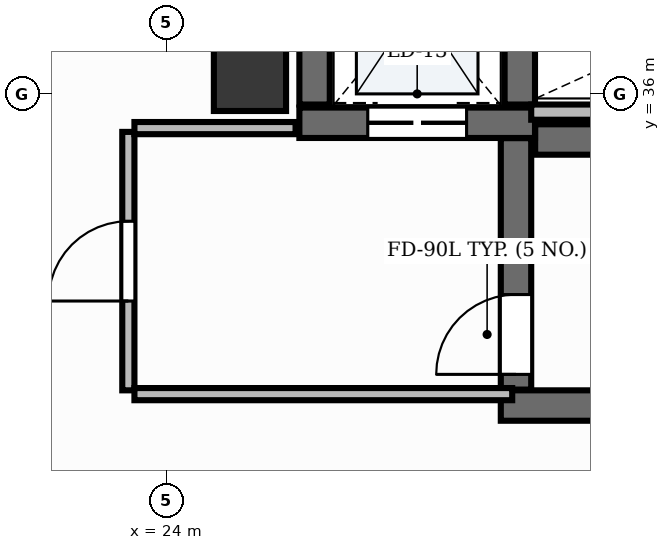
"""IFC4 building model, lengths in metres.
Left out: names, types, materials, properties, quantities, classifications, styles, units other than length and angle.
Written with IfcOpenShell. Run it as: python <this file> out.ifc"""

import sys

from ifc_helpers import new_model, si_unit, direction, frame, frame_2d, origin, origin_2d, place, context, subcontext, project, spatial, rectangle, extrude, element, fill, save


model = new_model("IFC4")
c1 = context("Model", 3, precision=1e-05, world=origin(), true_north=direction((0.0, 1.0)))
c2 = subcontext(c1, "Body", "Model", "MODEL_VIEW")
j1 = project(units=[si_unit("LENGTHUNIT", "METRE"), si_unit("PLANEANGLEUNIT", "RADIAN")], contexts=[c1])
p1 = place(None, origin())
s1 = spatial("IfcSite", under=j1, at=p1, CompositionType="ELEMENT")
p2 = place(p1, origin())
s2 = spatial("IfcBuilding", under=s1, at=p2, CompositionType="ELEMENT")
p3 = place(p2, frame((0.0, 0.0, 175.2)))
s3 = spatial("IfcBuildingStorey", under=s2, at=p3, CompositionType="ELEMENT", Elevation=175.2)
p4 = place(p3, frame((28.852, 35.4, 0.0), z_axis=(0.0, 0.0, 1.0), x_axis=(1.0, 0.0, 0.0)))
e1 = element("IfcWall", 1, at=p4, inside=s3, PredefinedType="SHEAR", context=c2, shape_type="SweptSolid", body=[
    extrude(rectangle(XDim=8.198, YDim=0.4, at=frame_2d((4.099, 0.0))), origin(), (0.0, 0.0, 1.0), 3.9),
])
p5 = place(p3, frame((28.4, 31.9, 0.0), z_axis=(0.0, 0.0, 1.0), x_axis=(1.0, 0.0, 0.0)))
e2 = element("IfcWall", 2, at=p5, inside=s3, PredefinedType="SHEAR", context=c2, shape_type="SweptSolid", body=[
    extrude(rectangle(XDim=8.65, YDim=0.4, at=frame_2d((4.325, 0.0))), origin(), (0.0, 0.0, 1.0), 3.9),
])
p6 = place(p3, frame((28.6, 32.11, 0.0), z_axis=(0.0, 0.0, 1.0), x_axis=(0.0, 1.0, 0.0)))
e3 = element("IfcWall", 3, at=p6, inside=s3, PredefinedType="SHEAR", context=c2, shape_type="SweptSolid", body=[
    extrude(rectangle(XDim=3.308, YDim=0.4, at=frame_2d((1.654, 0.0))), origin(), (0.0, 0.0, 1.0), 3.9),
])
p7 = place(p6, frame((0.2, 0.0, 0.0)))
e4 = element("IfcOpeningElement", 4, at=p7, cuts=e3, PredefinedType="OPENING", context=c2, shape_type="SweptSolid", body=[
    extrude(rectangle(XDim=1.05, YDim=2.15, at=frame_2d((0.525, 1.075))), frame((0.0, 0.215, 0.0), z_axis=(0.0, -1.0, 0.0), x_axis=(1.0, 0.0, 0.0)), (0.0, 0.0, 1.0), 0.43),
])
p8 = place(p3, frame((25.75, 35.62, 0.0), z_axis=(0.0, 0.0, 1.0), x_axis=(1.0, 0.0, 0.0)))
e5 = element("IfcWall", 5, at=p8, inside=s3, PredefinedType="SHEAR", context=c2, shape_type="SweptSolid", body=[
    extrude(rectangle(XDim=3.1, YDim=0.4, at=frame_2d((1.55, 0.0))), origin(), (0.0, 0.0, 1.0), 3.9),
])
p9 = place(p8, frame((0.9, 0.0, 0.0)))
e6 = element("IfcOpeningElement", 6, at=p9, cuts=e5, PredefinedType="OPENING", context=c2, shape_type="SweptSolid", body=[
    extrude(rectangle(XDim=1.3, YDim=2.2, at=frame_2d((0.65, 1.1))), frame((0.0, 0.215, 0.0), z_axis=(0.0, -1.0, 0.0), x_axis=(1.0, 0.0, 0.0)), (0.0, 0.0, 1.0), 0.43),
])
for number, where, z_axis, x_axis in (
    (7, (25.95, 35.86, 0.0), (0.0, 0.0, 1.0), (0.0, 1.0, 0.0)),
    (8, (28.65, 35.86, 0.0), (0.0, 0.0, 1.0), (0.0, 1.0, 0.0)),
):
    element("IfcWall", number, at=place(p3, frame(where, z_axis=z_axis, x_axis=x_axis)), inside=s3, PredefinedType="SHEAR", context=c2, shape_type="SweptSolid", body=[
        extrude(rectangle(XDim=2.7, YDim=0.4, at=frame_2d((1.35, 0.0))), origin(), (0.0, 0.0, 1.0), 3.9),
    ])
p10 = place(p3, frame((25.1, 36.25, -0.0), z_axis=(0.0, 0.0, 1.0), x_axis=(1.0, 0.0, 0.0)))
e9 = element("IfcColumn", 9, at=p10, inside=s3, PredefinedType="PILASTER", context=c2, shape_type="SweptSolid", body=[
    extrude(rectangle(XDim=0.95, YDim=0.95, at=origin_2d()), origin(), (0.0, 0.0, 1.0), 3.901),
])
p11 = place(p3, frame((28.8, 35.76, 0.0), z_axis=(0.0, 0.0, 1.0), x_axis=(1.0, 0.0, 0.0)))
e10 = element("IfcWall", 10, at=p11, inside=s3, PredefinedType="PARTITIONING", context=c2, shape_type="SweptSolid", body=[
    extrude(rectangle(XDim=4.57, YDim=0.2, at=frame_2d((2.285, 0.0))), origin(), (0.0, 0.0, 1.0), 2.91),
])
p12 = place(p3, frame((23.5, 32.1, 0.0), z_axis=(0.0, 0.0, 1.0), x_axis=(0.0, 1.0, 0.0)))
e11 = element("IfcWall", 11, at=p12, inside=s3, PredefinedType="PARTITIONING", context=c2, shape_type="SweptSolid", body=[
    extrude(rectangle(XDim=3.4, YDim=0.16, at=frame_2d((1.7, 0.0))), origin(), (0.0, 0.0, 1.0), 2.91),
])
p13 = place(p12, frame((1.175, 0.0, 0.0)))
e12 = element("IfcOpeningElement", 12, at=p13, cuts=e11, PredefinedType="OPENING", context=c2, shape_type="SweptSolid", body=[
    extrude(rectangle(XDim=1.05, YDim=2.15, at=frame_2d((0.525, 1.075))), frame((0.0, 0.095, 0.0), z_axis=(0.0, -1.0, 0.0), x_axis=(1.0, 0.0, 0.0)), (0.0, 0.0, 1.0), 0.19),
])
p14 = place(p3, frame((23.58, 32.05, 0.0), z_axis=(0.0, 0.0, 1.0), x_axis=(1.0, 0.0, 0.0)))
e13 = element("IfcWall", 13, at=p14, inside=s3, PredefinedType="PARTITIONING", context=c2, shape_type="SweptSolid", body=[
    extrude(rectangle(XDim=4.97, YDim=0.16, at=frame_2d((2.485, 0.0))), origin(), (0.0, 0.0, 1.0), 2.91),
])
p15 = place(p3, frame((23.58, 35.55, 0.0), z_axis=(0.0, 0.0, 1.0), x_axis=(1.0, 0.0, 0.0)))
e14 = element("IfcWall", 14, at=p15, inside=s3, PredefinedType="PARTITIONING", context=c2, shape_type="SweptSolid", body=[
    extrude(rectangle(XDim=2.12, YDim=0.16, at=frame_2d((1.06, 0.0))), origin(), (0.0, 0.0, 1.0), 2.91),
])
p16 = place(p7, origin())
e15 = element("IfcDoor", 15, at=p16, inside=s3, OperationType="SINGLE_SWING_LEFT", PredefinedType="DOOR", context=c2, shape_type="SweptSolid", body=[
    extrude(rectangle(XDim=1.05, YDim=2.15, at=frame_2d((0.525, 1.075))), frame((0.0, 0.025, 0.0), z_axis=(0.0, -1.0, 0.0), x_axis=(1.0, 0.0, 0.0)), (0.0, 0.0, 1.0), 0.05),
])
fill(e4, e15)
p17 = place(p9, origin())
e16 = element("IfcDoor", 16, at=p17, inside=s3, OperationType="DOUBLE_DOOR_SLIDING", PredefinedType="DOOR", context=c2, shape_type="SweptSolid", body=[
    extrude(rectangle(XDim=1.3, YDim=2.2, at=frame_2d((0.65, 1.1))), frame((0.0, 0.025, 0.0), z_axis=(0.0, -1.0, 0.0), x_axis=(1.0, 0.0, 0.0)), (0.0, 0.0, 1.0), 0.05),
])
fill(e6, e16)
p18 = place(p13, origin())
e17 = element("IfcDoor", 17, at=p18, inside=s3, OperationType="SINGLE_SWING_LEFT", PredefinedType="DOOR", context=c2, shape_type="SweptSolid", body=[
    extrude(rectangle(XDim=1.05, YDim=2.15, at=frame_2d((0.525, 1.075))), frame((0.0, 0.025, 0.0), z_axis=(0.0, -1.0, 0.0), x_axis=(1.0, 0.0, 0.0)), (0.0, 0.0, 1.0), 0.05),
])
fill(e12, e17)
save(model, sys.argv[1])
